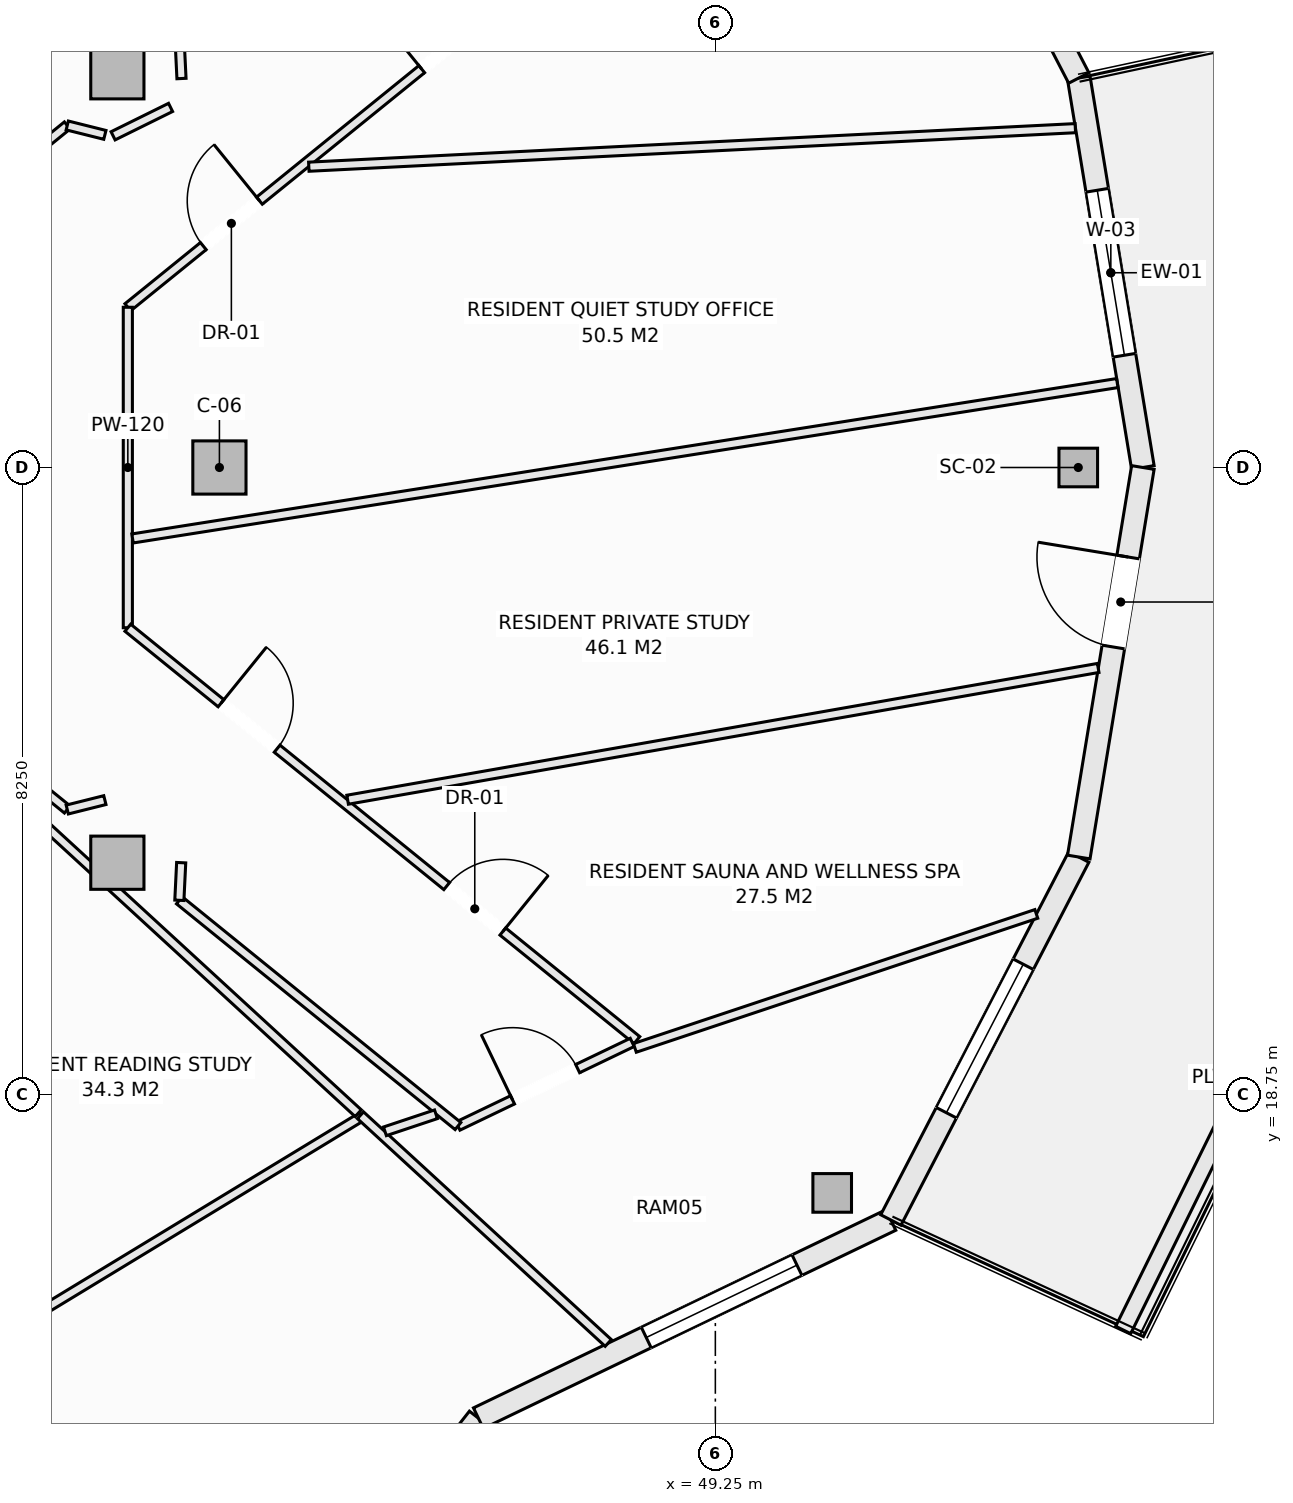
"""IFC4 building model, lengths in metres.
Left out: names, types, materials, properties, quantities, classifications, styles, units other than length and angle.
Written with IfcOpenShell. Run it as: python <this file> out.ifc"""

import sys

from ifc_helpers import new_model, si_unit, direction, frame, frame_2d, origin, origin_2d, place, context, subcontext, project, spatial, rectangle, hollow_rectangle, extrude, element, fill, save


model = new_model("IFC4")
c1 = context("Model", 3, precision=1e-05, world=origin(), true_north=direction((0.0, 1.0)))
c2 = subcontext(c1, "Body", "Model", "MODEL_VIEW")
j1 = project(units=[si_unit("LENGTHUNIT", "METRE"), si_unit("PLANEANGLEUNIT", "RADIAN")], contexts=[c1])
p1 = place(None, origin())
s1 = spatial("IfcSite", under=j1, at=p1, CompositionType="ELEMENT")
p2 = place(p1, origin())
s2 = spatial("IfcBuilding", under=s1, at=p2, CompositionType="ELEMENT")
p3 = place(p2, frame((0.0, 0.0, 222.8)))
s3 = spatial("IfcBuildingStorey", under=s2, at=p3, CompositionType="ELEMENT", Elevation=222.8)
for number, where, z_axis, x_axis in (
    (1, (54.025, 27.0, -0.27), (0.0, 0.0, 1.0), (1.0, 0.0, 0.0)),
    (2, (50.787, 17.456, -0.27), (0.0, 0.0, 1.0), (1.0, 0.0, 0.0)),
):
    element("IfcColumn", number, at=place(p3, frame(where, z_axis=z_axis, x_axis=x_axis)), inside=s3, PredefinedType="COLUMN", context=c2, shape_type="SweptSolid", body=[
        extrude(hollow_rectangle(XDim=0.508, YDim=0.508, WallThickness=0.019, at=origin_2d()), origin(), (0.0, 0.0, 1.0), 3.3),
    ])
for number, where, z_axis, x_axis in (
    (3, (42.725, 27.0, -0.27), (0.0, 0.0, 1.0), (1.0, 0.0, 0.0)),
    (4, (41.382, 32.199, -0.27), (0.0, 0.0, 1.0), (1.0, 0.0, 0.0)),
    (5, (41.382, 21.801, -0.27), (0.0, 0.0, 1.0), (1.0, 0.0, 0.0)),
):
    element("IfcColumn", number, at=place(p3, frame(where, z_axis=z_axis, x_axis=x_axis)), inside=s3, PredefinedType="COLUMN", context=c2, shape_type="SweptSolid", body=[
        extrude(rectangle(XDim=0.7, YDim=0.7, at=origin_2d()), origin(), (0.0, 0.0, 1.0), 3.3),
    ])
p4 = place(p3, frame((54.032, 32.125, 0.0), z_axis=(0.0, 0.0, 1.0), x_axis=(0.16237087798, -0.986729799886, 0.0)))
e6 = element("IfcWall", 6, at=p4, inside=s3, PredefinedType="SOLIDWALL", context=c2, shape_type="SweptSolid", body=[
    extrude(rectangle(XDim=5.193, YDim=0.3, at=frame_2d((2.597, 0.0))), origin(), (0.0, 0.0, 1.0), 2.605),
])
p5 = place(p4, frame((1.497, 0.0, 0.72)))
e7 = element("IfcOpeningElement", 7, at=p5, cuts=e6, PredefinedType="OPENING", context=c2, shape_type="SweptSolid", body=[
    extrude(rectangle(XDim=2.2, YDim=1.65, at=frame_2d((1.1, 0.825))), frame((0.0, 0.16, 0.0), z_axis=(0.0, -1.0, 0.0), x_axis=(1.0, 0.0, 0.0)), (0.0, 0.0, 1.0), 0.32),
])
p6 = place(p3, frame((51.559, 36.9, 0.0), z_axis=(0.0, 0.0, 1.0), x_axis=(0.459808219482, -0.888018243786, 0.0)))
e8 = element("IfcWall", 8, at=p6, inside=s3, PredefinedType="SOLIDWALL", context=c2, shape_type="SweptSolid", body=[
    extrude(rectangle(XDim=5.378, YDim=0.3, at=frame_2d((2.689, 0.0))), origin(), (0.0, 0.0, 1.0), 2.605),
])
p7 = place(p6, frame((1.589, 0.0, 0.72)))
e9 = element("IfcOpeningElement", 9, at=p7, cuts=e8, PredefinedType="OPENING", context=c2, shape_type="SweptSolid", body=[
    extrude(rectangle(XDim=2.2, YDim=1.65, at=frame_2d((1.1, 0.825))), frame((0.0, 0.16, 0.0), z_axis=(0.0, -1.0, 0.0), x_axis=(1.0, 0.0, 0.0)), (0.0, 0.0, 1.0), 0.32),
])
p8 = place(p3, frame((42.5, 9.853, 0.0), z_axis=(0.0, 0.0, 1.0), x_axis=(0.616450126935, 0.787393955401, 0.0)))
e10 = element("IfcWall", 10, at=p8, inside=s3, PredefinedType="SOLIDWALL", context=c2, shape_type="SweptSolid", body=[
    extrude(rectangle(XDim=5.893, YDim=0.3, at=frame_2d((2.946, 0.0))), origin(), (0.0, 0.0, 1.0), 2.605),
])
p9 = place(p8, frame((1.846, 0.0, 0.72)))
e11 = element("IfcOpeningElement", 11, at=p9, cuts=e10, PredefinedType="OPENING", context=c2, shape_type="SweptSolid", body=[
    extrude(rectangle(XDim=2.2, YDim=1.65, at=frame_2d((1.1, 0.825))), frame((0.0, 0.16, 0.0), z_axis=(0.0, -1.0, 0.0), x_axis=(1.0, 0.0, 0.0)), (0.0, 0.0, 1.0), 0.32),
])
p10 = place(p3, frame((46.133, 14.493, 0.0), z_axis=(0.0, 0.0, 1.0), x_axis=(0.901348331142, 0.433094892545, 0.0)))
e12 = element("IfcWall", 12, at=p10, inside=s3, PredefinedType="SOLIDWALL", context=c2, shape_type="SweptSolid", body=[
    extrude(rectangle(XDim=6.021, YDim=0.3, at=frame_2d((3.01, 0.0))), origin(), (0.0, 0.0, 1.0), 2.605),
])
p11 = place(p10, frame((2.45, 0.0, 0.72)))
e13 = element("IfcOpeningElement", 13, at=p11, cuts=e12, PredefinedType="OPENING", context=c2, shape_type="SweptSolid", body=[
    extrude(rectangle(XDim=2.2, YDim=1.65, at=frame_2d((1.1, 0.825))), frame((0.0, 0.16, 0.0), z_axis=(0.0, -1.0, 0.0), x_axis=(1.0, 0.0, 0.0)), (0.0, 0.0, 1.0), 0.32),
])
p12 = place(p3, frame((51.559, 17.1, 0.0), z_axis=(0.0, 0.0, 1.0), x_axis=(0.459808219482, 0.888018243786, 0.0)))
e14 = element("IfcWall", 14, at=p12, inside=s3, PredefinedType="SOLIDWALL", context=c2, shape_type="SweptSolid", body=[
    extrude(rectangle(XDim=5.378, YDim=0.3, at=frame_2d((2.689, 0.0))), origin(), (0.0, 0.0, 1.0), 2.605),
])
p13 = place(p12, frame((1.589, 0.0, 0.72)))
e15 = element("IfcOpeningElement", 15, at=p13, cuts=e14, PredefinedType="OPENING", context=c2, shape_type="SweptSolid", body=[
    extrude(rectangle(XDim=2.2, YDim=1.65, at=frame_2d((1.1, 0.825))), frame((0.0, 0.16, 0.0), z_axis=(0.0, -1.0, 0.0), x_axis=(1.0, 0.0, 0.0)), (0.0, 0.0, 1.0), 0.32),
])
p14 = place(p3, frame((54.032, 21.875, 0.0), z_axis=(0.0, 0.0, 1.0), x_axis=(0.16237087798, 0.986729799886, 0.0)))
e16 = element("IfcWall", 16, at=p14, inside=s3, PredefinedType="SOLIDWALL", context=c2, shape_type="SweptSolid", body=[
    extrude(rectangle(XDim=5.193, YDim=0.3, at=frame_2d((2.597, 0.0))), origin(), (0.0, 0.0, 1.0), 2.605),
])
p15 = place(p14, frame((2.8, 0.0, 0.0)))
e17 = element("IfcOpeningElement", 17, at=p15, cuts=e16, PredefinedType="OPENING", context=c2, shape_type="SweptSolid", body=[
    extrude(rectangle(XDim=1.2, YDim=2.2, at=frame_2d((0.6, 1.1))), frame((0.0, 0.16, 0.0), z_axis=(0.0, -1.0, 0.0), x_axis=(1.0, 0.0, 0.0)), (0.0, 0.0, 1.0), 0.32),
])
p16 = place(p3, frame((54.616, 15.653, 0.0), z_axis=(0.0, 0.0, 1.0), x_axis=(0.441640961804, 0.897191875162, 0.0)))
e18 = element("IfcWall", 18, at=p16, inside=s3, PredefinedType="PARAPET", context=c2, shape_type="SweptSolid", body=[
    extrude(rectangle(XDim=6.178, YDim=0.22, at=frame_2d((3.089, 0.0))), origin(), (0.0, 0.0, 1.0), 0.52),
])
p17 = place(p3, frame((40.255, 31.12, 0.0), z_axis=(0.0, 0.0, 1.0), x_axis=(0.776423627794, 0.630211353598, 0.0)))
e19 = element("IfcWall", 19, at=p17, inside=s3, PredefinedType="PARTITIONING", context=c2, shape_type="SweptSolid", body=[
    extrude(rectangle(XDim=0.603, YDim=0.12, at=frame_2d((0.301, 0.0))), origin(), (0.0, 0.0, 1.0), 3.03),
])
p18 = place(p3, frame((40.723, 31.5, 0.0), z_axis=(0.0, 0.0, 1.0), x_axis=(0.970029850173, -0.24298578101, 0.0)))
e20 = element("IfcWall", 20, at=p18, inside=s3, PredefinedType="PARTITIONING", context=c2, shape_type="SweptSolid", body=[
    extrude(rectangle(XDim=0.51, YDim=0.12, at=frame_2d((0.255, 0.0))), origin(), (0.0, 0.0, 1.0), 3.03),
])
p19 = place(p3, frame((42.198, 32.694, 0.0), z_axis=(0.0, 0.0, 1.0), x_axis=(0.048629948931, -0.998816864128, 0.0)))
e21 = element("IfcWall", 21, at=p19, inside=s3, PredefinedType="PARTITIONING", context=c2, shape_type="SweptSolid", body=[
    extrude(rectangle(XDim=0.577, YDim=0.12, at=frame_2d((0.289, 0.0))), origin(), (0.0, 0.0, 1.0), 3.03),
])
p20 = place(p3, frame((41.52, 29.108, 0.0), z_axis=(0.0, 0.0, 1.0), x_axis=(0.777032738693, 0.629460183808, 0.0)))
e22 = element("IfcWall", 22, at=p20, inside=s3, PredefinedType="PARTITIONING", context=c2, shape_type="SweptSolid", body=[
    extrude(rectangle(XDim=8.552, YDim=0.12, at=frame_2d((4.276, 0.0))), origin(), (0.0, 0.0, 1.0), 3.03),
])
p21 = place(p20, frame((1.278, 0.0, 0.0)))
e23 = element("IfcOpeningElement", 23, at=p21, cuts=e22, PredefinedType="OPENING", context=c2, shape_type="SweptSolid", body=[
    extrude(rectangle(XDim=0.95, YDim=2.1, at=frame_2d((0.475, 1.05))), frame((0.0, 0.07, 0.0), z_axis=(0.0, -1.0, 0.0), x_axis=(1.0, 0.0, 0.0)), (0.0, 0.0, 1.0), 0.14),
])
p22 = place(p20, frame((4.977, 0.0, 0.0)))
e24 = element("IfcOpeningElement", 24, at=p22, cuts=e22, PredefinedType="OPENING", context=c2, shape_type="SweptSolid", body=[
    extrude(rectangle(XDim=0.95, YDim=2.1, at=frame_2d((0.475, 1.05))), frame((0.0, 0.07, 0.0), z_axis=(0.0, -1.0, 0.0), x_axis=(1.0, 0.0, 0.0)), (0.0, 0.0, 1.0), 0.14),
])
p23 = place(p3, frame((41.52, 24.892, 0.0), z_axis=(0.0, 0.0, 1.0), x_axis=(0.0, 1.0, 0.0)))
e25 = element("IfcWall", 25, at=p23, inside=s3, PredefinedType="PARTITIONING", context=c2, shape_type="SweptSolid", body=[
    extrude(rectangle(XDim=4.216, YDim=0.12, at=frame_2d((2.108, 0.0))), origin(), (0.0, 0.0, 1.0), 3.03),
])
p24 = place(p3, frame((41.52, 24.892, 0.0), z_axis=(0.0, 0.0, 1.0), x_axis=(0.777027167904, -0.629467060567, 0.0)))
e26 = element("IfcWall", 26, at=p24, inside=s3, PredefinedType="PARTITIONING", context=c2, shape_type="SweptSolid", body=[
    extrude(rectangle(XDim=8.62, YDim=0.12, at=frame_2d((4.31, 0.0))), origin(), (0.0, 0.0, 1.0), 2.77),
])
p25 = place(p24, frame((5.4, 0.0, 0.0)))
e27 = element("IfcOpeningElement", 27, at=p25, cuts=e26, PredefinedType="OPENING", context=c2, shape_type="SweptSolid", body=[
    extrude(rectangle(XDim=0.95, YDim=2.1, at=frame_2d((0.475, 1.05))), frame((0.0, 0.07, 0.0), z_axis=(0.0, -1.0, 0.0), x_axis=(1.0, 0.0, 0.0)), (0.0, 0.0, 1.0), 0.14),
])
p26 = place(p24, frame((1.578, 0.0, 0.0)))
e28 = element("IfcOpeningElement", 28, at=p26, cuts=e26, PredefinedType="OPENING", context=c2, shape_type="SweptSolid", body=[
    extrude(rectangle(XDim=0.95, YDim=2.1, at=frame_2d((0.475, 1.05))), frame((0.0, 0.07, 0.0), z_axis=(0.0, -1.0, 0.0), x_axis=(1.0, 0.0, 0.0)), (0.0, 0.0, 1.0), 0.14),
])
p27 = place(p3, frame((45.864, 18.336, 0.0), z_axis=(0.0, 0.0, 1.0), x_axis=(0.901512568896, 0.432752918097, 0.0)))
e29 = element("IfcWall", 29, at=p27, inside=s3, PredefinedType="PARTITIONING", context=c2, shape_type="SweptSolid", body=[
    extrude(rectangle(XDim=2.543, YDim=0.12, at=frame_2d((1.271, 0.0))), origin(), (0.0, 0.0, 1.0), 3.03),
])
p28 = place(p27, frame((0.796, 0.0, 0.0)))
e30 = element("IfcOpeningElement", 30, at=p28, cuts=e29, PredefinedType="OPENING", context=c2, shape_type="SweptSolid", body=[
    extrude(rectangle(XDim=0.95, YDim=2.1, at=frame_2d((0.475, 1.05))), frame((0.0, 0.07, 0.0), z_axis=(0.0, -1.0, 0.0), x_axis=(1.0, 0.0, 0.0)), (0.0, 0.0, 1.0), 0.14),
])
p29 = place(p3, frame((40.082, 23.02, 0.0), z_axis=(0.0, 0.0, 1.0), x_axis=(0.776900403314, -0.629623509195, 0.0)))
e31 = element("IfcWall", 31, at=p29, inside=s3, PredefinedType="PARTITIONING", context=c2, shape_type="SweptSolid", body=[
    extrude(rectangle(XDim=0.825, YDim=0.12, at=frame_2d((0.413, 0.0))), origin(), (0.0, 0.0, 1.0), 3.03),
])
p30 = place(p3, frame((42.198, 21.306, 0.0), z_axis=(0.0, 0.0, 1.0), x_axis=(0.777012245854, -0.629485480208, 0.0)))
e32 = element("IfcWall", 32, at=p30, inside=s3, PredefinedType="PARTITIONING", context=c2, shape_type="SweptSolid", body=[
    extrude(rectangle(XDim=4.718, YDim=0.12, at=frame_2d((2.359, 0.0))), origin(), (0.0, 0.0, 1.0), 2.77),
])
p31 = place(p3, frame((42.198, 21.306, 0.0), z_axis=(0.0, 0.0, 1.0), x_axis=(0.048267148556, 0.998834461946, 0.0)))
e33 = element("IfcWall", 33, at=p31, inside=s3, PredefinedType="PARTITIONING", context=c2, shape_type="SweptSolid", body=[
    extrude(rectangle(XDim=0.496, YDim=0.12, at=frame_2d((0.248, 0.0))), origin(), (0.0, 0.0, 1.0), 3.03),
])
p32 = place(p3, frame((40.723, 22.5, 0.0), z_axis=(0.0, 0.0, 1.0), x_axis=(0.970029850173, 0.24298578101, 0.0)))
e34 = element("IfcWall", 34, at=p32, inside=s3, PredefinedType="PARTITIONING", context=c2, shape_type="SweptSolid", body=[
    extrude(rectangle(XDim=0.51, YDim=0.12, at=frame_2d((0.255, 0.0))), origin(), (0.0, 0.0, 1.0), 3.03),
])
p33 = place(p3, frame((41.582, 26.066, 0.0), z_axis=(0.0, 0.0, 1.0), x_axis=(0.987780616659, 0.155850740621, 0.0)))
e35 = element("IfcWall", 35, at=p33, inside=s3, PredefinedType="PARTITIONING", context=c2, shape_type="SweptSolid", body=[
    extrude(rectangle(XDim=13.116, YDim=0.12, at=frame_2d((6.558, 0.0))), origin(), (0.0, 0.0, 1.0), 2.478),
])
p34 = place(p3, frame((36.012, 13.247, 0.0), z_axis=(0.0, 0.0, 1.0), x_axis=(0.85474937032, 0.519040955934, 0.0)))
e36 = element("IfcWall", 36, at=p34, inside=s3, PredefinedType="PARTITIONING", context=c2, shape_type="SweptSolid", body=[
    extrude(rectangle(XDim=10.04, YDim=0.12, at=frame_2d((5.02, 0.0))), origin(), (0.0, 0.0, 1.0), 3.03),
])
p35 = place(p3, frame((39.706, 22.958, 0.0), z_axis=(0.0, 0.0, 1.0), x_axis=(0.73633751064, -0.676614417837, 0.0)))
e37 = element("IfcWall", 37, at=p35, inside=s3, PredefinedType="PARTITIONING", context=c2, shape_type="SweptSolid", body=[
    extrude(rectangle(XDim=6.582, YDim=0.12, at=frame_2d((3.291, 0.0))), origin(), (0.0, 0.0, 1.0), 3.03),
])
p36 = place(p3, frame((44.581, 18.478, 0.0), z_axis=(0.0, 0.0, 1.0), x_axis=(0.736361674887, -0.676588119729, 0.0)))
e38 = element("IfcWall", 38, at=p36, inside=s3, PredefinedType="PARTITIONING", context=c2, shape_type="SweptSolid", body=[
    extrude(rectangle(XDim=4.427, YDim=0.12, at=frame_2d((2.214, 0.0))), origin(), (0.0, 0.0, 1.0), 3.03),
])
p37 = place(p3, frame((44.903, 18.267, 0.0), z_axis=(0.0, 0.0, 1.0), x_axis=(0.948614335511, 0.316434578488, 0.0)))
e39 = element("IfcWall", 39, at=p37, inside=s3, PredefinedType="PARTITIONING", context=c2, shape_type="SweptSolid", body=[
    extrude(rectangle(XDim=0.708, YDim=0.12, at=frame_2d((0.354, 0.0))), origin(), (0.0, 0.0, 1.0), 3.03),
])
p38 = place(p3, frame((48.191, 19.364, 0.0), z_axis=(0.0, 0.0, 1.0), x_axis=(0.948573630056, 0.316556580033, 0.0)))
e40 = element("IfcWall", 40, at=p38, inside=s3, PredefinedType="PARTITIONING", context=c2, shape_type="SweptSolid", body=[
    extrude(rectangle(XDim=5.568, YDim=0.12, at=frame_2d((2.784, 0.0))), origin(), (0.0, 0.0, 1.0), 3.03),
])
p39 = place(p3, frame((44.412, 22.629, 0.0), z_axis=(0.0, 0.0, 1.0), x_axis=(0.984937605234, 0.172910132136, 0.0)))
e41 = element("IfcWall", 41, at=p39, inside=s3, PredefinedType="PARTITIONING", context=c2, shape_type="SweptSolid", body=[
    extrude(rectangle(XDim=10.026, YDim=0.12, at=frame_2d((5.013, 0.0))), origin(), (0.0, 0.0, 1.0), 2.77),
])
p40 = place(p3, frame((43.901, 30.957, 0.0), z_axis=(0.0, 0.0, 1.0), x_axis=(0.998738311517, 0.050217378547, 0.0)))
e42 = element("IfcWall", 42, at=p40, inside=s3, PredefinedType="PARTITIONING", context=c2, shape_type="SweptSolid", body=[
    extrude(rectangle(XDim=10.098, YDim=0.12, at=frame_2d((5.049, 0.0))), origin(), (0.0, 0.0, 1.0), 3.03),
])
p41 = place(p3, frame((41.326, 31.364, 0.0), z_axis=(0.0, 0.0, 1.0), x_axis=(0.896444200568, 0.443156626112, 0.0)))
e43 = element("IfcWall", 43, at=p41, inside=s3, PredefinedType="PARTITIONING", context=c2, shape_type="SweptSolid", body=[
    extrude(rectangle(XDim=0.844, YDim=0.12, at=frame_2d((0.422, 0.0))), origin(), (0.0, 0.0, 1.0), 3.03),
])
p42 = place(p5, origin())
e44 = element("IfcWindow", 44, at=p42, inside=s3, PartitioningType="SINGLE_PANEL", PredefinedType="WINDOW", context=c2, shape_type="SweptSolid", body=[
    extrude(rectangle(XDim=2.2, YDim=1.65, at=frame_2d((1.1, 0.825))), frame((0.0, 0.03, 0.0), z_axis=(0.0, -1.0, 0.0), x_axis=(1.0, 0.0, 0.0)), (0.0, 0.0, 1.0), 0.06),
])
fill(e7, e44)
p43 = place(p11, origin())
e45 = element("IfcWindow", 45, at=p43, inside=s3, PartitioningType="SINGLE_PANEL", PredefinedType="WINDOW", context=c2, shape_type="SweptSolid", body=[
    extrude(rectangle(XDim=2.2, YDim=1.65, at=frame_2d((1.1, 0.825))), frame((0.0, 0.03, 0.0), z_axis=(0.0, -1.0, 0.0), x_axis=(1.0, 0.0, 0.0)), (0.0, 0.0, 1.0), 0.06),
])
fill(e13, e45)
p44 = place(p13, origin())
e46 = element("IfcWindow", 46, at=p44, inside=s3, PartitioningType="SINGLE_PANEL", PredefinedType="WINDOW", context=c2, shape_type="SweptSolid", body=[
    extrude(rectangle(XDim=2.2, YDim=1.65, at=frame_2d((1.1, 0.825))), frame((0.0, 0.03, 0.0), z_axis=(0.0, -1.0, 0.0), x_axis=(1.0, 0.0, 0.0)), (0.0, 0.0, 1.0), 0.06),
])
fill(e15, e46)
p45 = place(p15, frame((1.2, 0.0, 0.0), z_axis=(0.0, 0.0, 1.0), x_axis=(-1.0, 0.0, 0.0)))
e47 = element("IfcDoor", 47, at=p45, inside=s3, OperationType="SINGLE_SWING_RIGHT", PredefinedType="DOOR", context=c2, shape_type="SweptSolid", body=[
    extrude(rectangle(XDim=1.2, YDim=2.2, at=frame_2d((0.6, 1.1))), frame((0.0, 0.025, 0.0), z_axis=(0.0, -1.0, 0.0), x_axis=(1.0, 0.0, 0.0)), (0.0, 0.0, 1.0), 0.05),
])
fill(e17, e47)
p46 = place(p28, origin())
e48 = element("IfcDoor", 48, at=p46, inside=s3, OperationType="SINGLE_SWING_LEFT", PredefinedType="DOOR", context=c2, shape_type="SweptSolid", body=[
    extrude(rectangle(XDim=0.95, YDim=2.1, at=frame_2d((0.475, 1.05))), frame((0.0, 0.025, 0.0), z_axis=(0.0, -1.0, 0.0), x_axis=(1.0, 0.0, 0.0)), (0.0, 0.0, 1.0), 0.05),
])
fill(e30, e48)
p47 = place(p25, origin())
e49 = element("IfcDoor", 49, at=p47, inside=s3, OperationType="SINGLE_SWING_RIGHT", PredefinedType="DOOR", context=c2, shape_type="SweptSolid", body=[
    extrude(rectangle(XDim=0.95, YDim=2.1, at=frame_2d((0.475, 1.05))), frame((0.0, 0.025, 0.0), z_axis=(0.0, -1.0, 0.0), x_axis=(1.0, 0.0, 0.0)), (0.0, 0.0, 1.0), 0.05),
])
fill(e27, e49)
p48 = place(p26, origin())
e50 = element("IfcDoor", 50, at=p48, inside=s3, OperationType="SINGLE_SWING_LEFT", PredefinedType="DOOR", context=c2, shape_type="SweptSolid", body=[
    extrude(rectangle(XDim=0.95, YDim=2.1, at=frame_2d((0.475, 1.05))), frame((0.0, 0.025, 0.0), z_axis=(0.0, -1.0, 0.0), x_axis=(1.0, 0.0, 0.0)), (0.0, 0.0, 1.0), 0.05),
])
fill(e28, e50)
p49 = place(p21, origin())
e51 = element("IfcDoor", 51, at=p49, inside=s3, OperationType="SINGLE_SWING_RIGHT", PredefinedType="DOOR", context=c2, shape_type="SweptSolid", body=[
    extrude(rectangle(XDim=0.95, YDim=2.1, at=frame_2d((0.475, 1.05))), frame((0.0, 0.025, 0.0), z_axis=(0.0, -1.0, 0.0), x_axis=(1.0, 0.0, 0.0)), (0.0, 0.0, 1.0), 0.05),
])
fill(e23, e51)
p50 = place(p22, origin())
e52 = element("IfcDoor", 52, at=p50, inside=s3, OperationType="SINGLE_SWING_LEFT", PredefinedType="DOOR", context=c2, shape_type="SweptSolid", body=[
    extrude(rectangle(XDim=0.95, YDim=2.1, at=frame_2d((0.475, 1.05))), frame((0.0, 0.025, 0.0), z_axis=(0.0, -1.0, 0.0), x_axis=(1.0, 0.0, 0.0)), (0.0, 0.0, 1.0), 0.05),
])
fill(e24, e52)
save(model, sys.argv[1])
